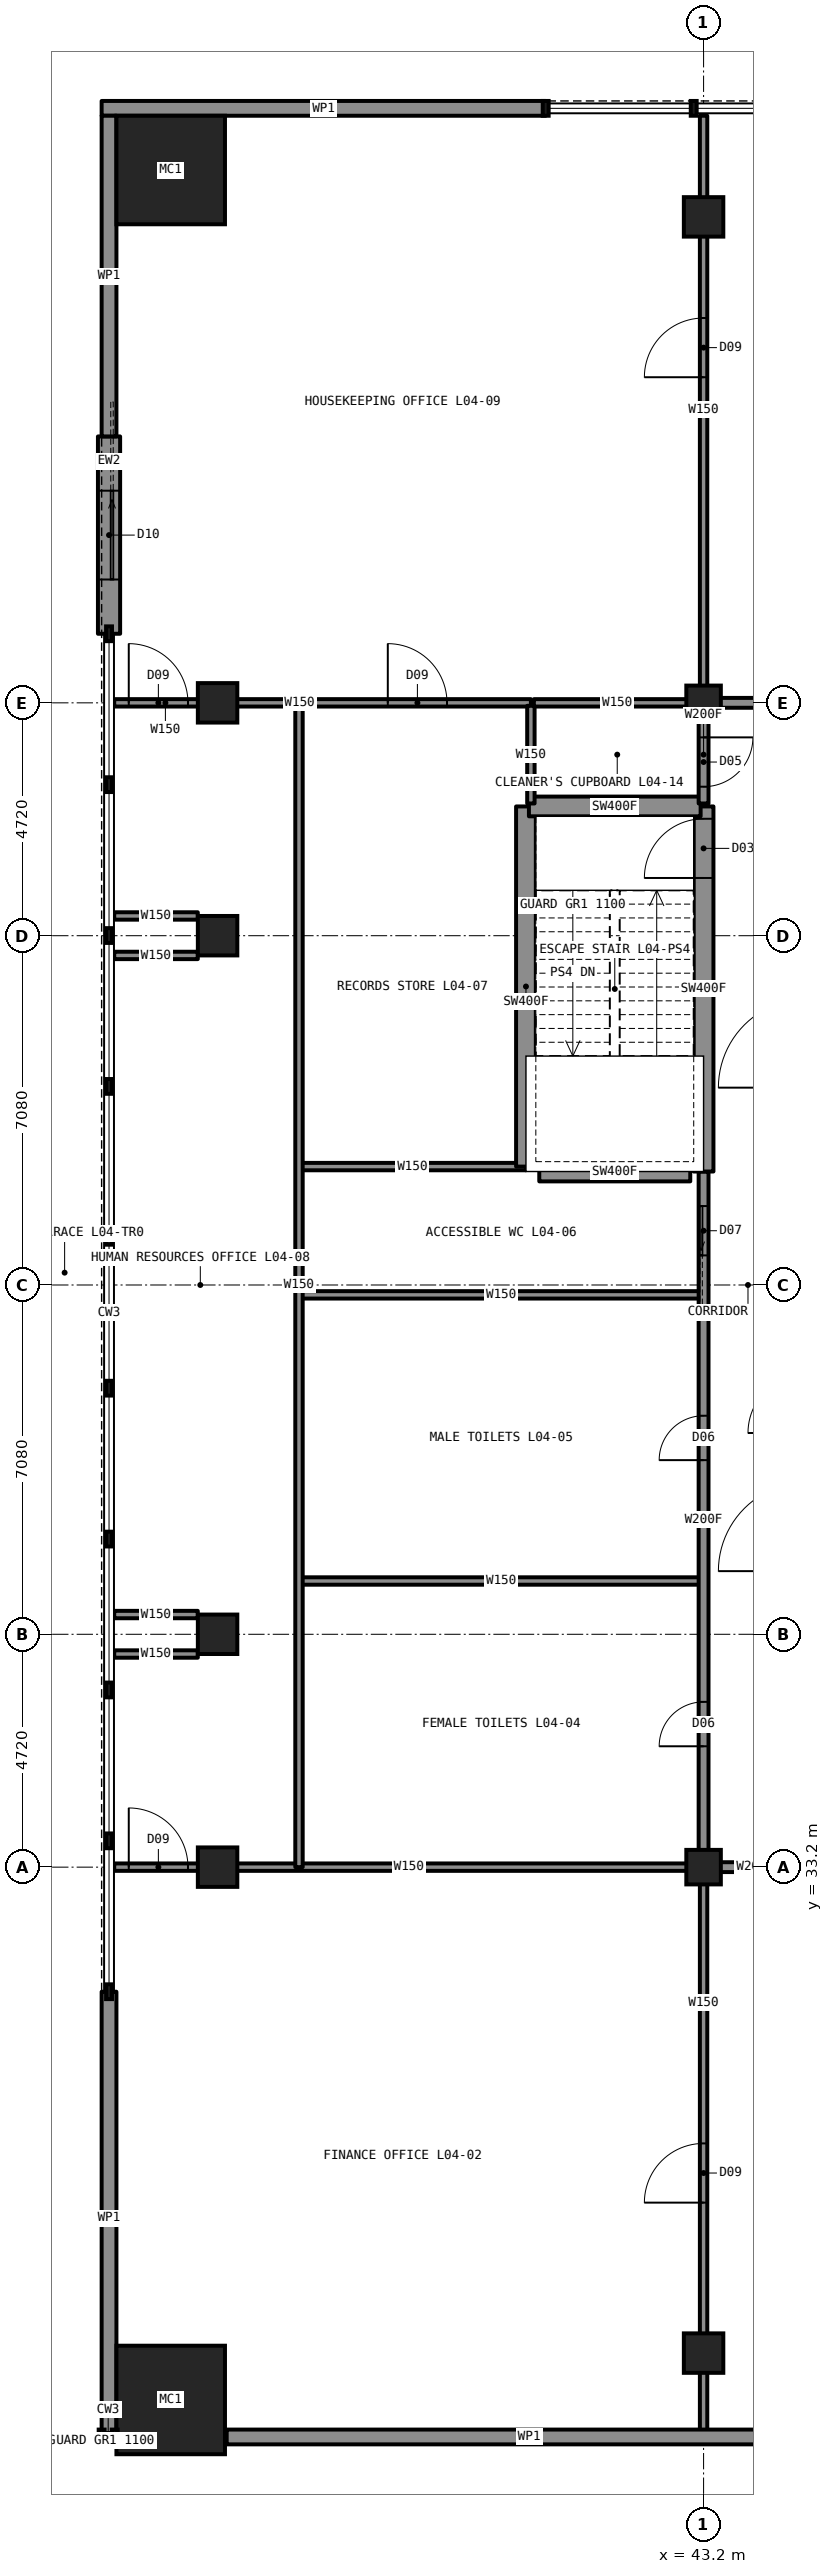
"""IFC4 building model, lengths in metres.
Left out: names, types, materials, properties, quantities, classifications, styles, units other than length and angle.
Written with IfcOpenShell. Run it as: python <this file> out.ifc"""

import sys

from ifc_helpers import new_model, si_unit, direction, frame, frame_2d, origin, origin_2d, place, context, subcontext, project, spatial, rectangle, hollow_rectangle, extrude, element, fill, save


model = new_model("IFC4")
c1 = context("Model", 3, precision=1e-05, world=origin(), true_north=direction((0.0, 1.0)))
c2 = subcontext(c1, "Body", "Model", "MODEL_VIEW")
j1 = project(units=[si_unit("LENGTHUNIT", "METRE"), si_unit("PLANEANGLEUNIT", "RADIAN")], contexts=[c1])
p1 = place(None, origin())
s1 = spatial("IfcSite", under=j1, at=p1, CompositionType="ELEMENT")
p2 = place(p1, origin())
s2 = spatial("IfcBuilding", under=s1, at=p2, CompositionType="ELEMENT")
p3 = place(p2, frame((0.0, 0.0, 20.5)))
s3 = spatial("IfcBuildingStorey", under=s2, at=p3, CompositionType="ELEMENT", Elevation=20.5)
for number, where, z_axis, x_axis in (
    (1, (33.35, 33.2, 0.0), (0.0, 0.0, 1.0), (1.0, 0.0, 0.0)),
    (2, (33.35, 37.92, 0.0), (0.0, 0.0, 1.0), (1.0, 0.0, 0.0)),
    (3, (33.35, 52.08, 0.0), (0.0, 0.0, 1.0), (1.0, 0.0, 0.0)),
    (4, (33.35, 56.8, 0.0), (0.0, 0.0, 1.0), (1.0, 0.0, 0.0)),
    (5, (43.2, 23.35, 0.0), (0.0, 0.0, 1.0), (1.0, 0.0, 0.0)),
    (6, (43.2, 66.65, 0.0), (0.0, 0.0, 1.0), (1.0, 0.0, 0.0)),
):
    element("IfcColumn", number, at=place(p3, frame(where, z_axis=z_axis, x_axis=x_axis)), inside=s3, PredefinedType="COLUMN", context=c2, shape_type="SweptSolid", body=[
        extrude(hollow_rectangle(XDim=0.8, YDim=0.8, WallThickness=0.05, at=origin_2d()), origin(), (0.0, 0.0, 1.0), 4.5),
    ])
for number, where, z_axis, x_axis in (
    (7, (43.2, 33.2, 0.0), (0.0, 0.0, 1.0), (1.0, 0.0, 0.0)),
    (8, (43.2, 56.8, 0.0), (0.0, 0.0, 1.0), (1.0, 0.0, 0.0)),
):
    element("IfcColumn", number, at=place(p3, frame(where, z_axis=z_axis, x_axis=x_axis)), inside=s3, PredefinedType="COLUMN", context=c2, shape_type="SweptSolid", body=[
        extrude(hollow_rectangle(XDim=0.7, YDim=0.7, WallThickness=0.06, at=origin_2d()), origin(), (0.0, 0.0, 1.0), 4.5),
    ])
for number, where, z_axis, x_axis in (
    (9, (32.4, 67.6, 0.0), (0.0, 0.0, 1.0), (1.0, 0.0, 0.0)),
    (10, (32.4, 22.4, 0.0), (0.0, 0.0, 1.0), (1.0, 0.0, 0.0)),
):
    element("IfcColumn", number, at=place(p3, frame(where, z_axis=z_axis, x_axis=x_axis)), inside=s3, PredefinedType="COLUMN", context=c2, shape_type="SweptSolid", body=[
        extrude(hollow_rectangle(XDim=2.2, YDim=2.2, WallThickness=0.15, at=origin_2d()), origin(), (0.0, 0.0, 1.0), 4.5),
    ])
p4 = place(p3, frame((35.0, 44.8, 0.0), z_axis=(0.0, 0.0, 1.0), x_axis=(1.0, 0.0, 0.0)))
e11 = element("IfcWall", 11, at=p4, inside=s3, PredefinedType="PARTITIONING", context=c2, shape_type="SweptSolid", body=[
    extrude(rectangle(XDim=8.2, YDim=0.15, at=frame_2d((4.1, 0.0))), origin(), (0.0, 0.0, 1.0), 3.13),
])
p5 = place(p3, frame((43.2, 33.2, 0.0), z_axis=(0.0, 0.0, 1.0), x_axis=(1.0, 0.0, 0.0)))
e12 = element("IfcWall", 12, at=p5, inside=s3, PredefinedType="PARTITIONING", context=c2, shape_type="SweptSolid", body=[
    extrude(rectangle(XDim=2.1, YDim=0.2, at=frame_2d((1.05, 0.0))), origin(), (0.0, 0.0, 1.0), 4.33),
])
p6 = place(p3, frame((31.255, 33.2, 0.0), z_axis=(0.0, 0.0, 1.0), x_axis=(1.0, 0.0, 0.0)))
e13 = element("IfcWall", 13, at=p6, inside=s3, PredefinedType="PARTITIONING", context=c2, shape_type="SweptSolid", body=[
    extrude(rectangle(XDim=11.945, YDim=0.15, at=frame_2d((5.973, 0.0))), origin(), (0.0, 0.0, 1.0), 3.13),
])
p7 = place(p6, frame((0.295, 0.0, 0.0)))
e14 = element("IfcOpeningElement", 14, at=p7, cuts=e13, PredefinedType="OPENING", context=c2, shape_type="SweptSolid", body=[
    extrude(rectangle(XDim=1.2, YDim=2.2, at=frame_2d((0.6, 1.1))), frame((0.0, 0.085, 0.0), z_axis=(0.0, -1.0, 0.0), x_axis=(1.0, 0.0, 0.0)), (0.0, 0.0, 1.0), 0.17),
])
p8 = place(p3, frame((35.0, 39.0, 0.0), z_axis=(0.0, 0.0, 1.0), x_axis=(1.0, 0.0, 0.0)))
e15 = element("IfcWall", 15, at=p8, inside=s3, PredefinedType="PARTITIONING", context=c2, shape_type="SweptSolid", body=[
    extrude(rectangle(XDim=8.2, YDim=0.15, at=frame_2d((4.1, 0.0))), origin(), (0.0, 0.0, 1.0), 4.33),
])
p9 = place(p3, frame((43.2, 56.8, 0.0), z_axis=(0.0, 0.0, 1.0), x_axis=(1.0, 0.0, 0.0)))
e16 = element("IfcWall", 16, at=p9, inside=s3, PredefinedType="PARTITIONING", context=c2, shape_type="SweptSolid", body=[
    extrude(rectangle(XDim=14.1, YDim=0.2, at=frame_2d((7.05, 0.0))), origin(), (0.0, 0.0, 1.0), 4.33),
])
p10 = place(p9, frame((4.9, 0.0, 0.0)))
e17 = element("IfcOpeningElement", 17, at=p10, cuts=e16, PredefinedType="OPENING", context=c2, shape_type="SweptSolid", body=[
    extrude(rectangle(XDim=1.8, YDim=2.2, at=frame_2d((0.9, 1.1))), frame((0.0, 0.11, 0.0), z_axis=(0.0, -1.0, 0.0), x_axis=(1.0, 0.0, 0.0)), (0.0, 0.0, 1.0), 0.22),
])
p11 = place(p3, frame((33.33, 56.8, 0.0), z_axis=(0.0, 0.0, 1.0), x_axis=(1.0, 0.0, 0.0)))
e18 = element("IfcWall", 18, at=p11, inside=s3, PredefinedType="PARTITIONING", context=c2, shape_type="SweptSolid", body=[
    extrude(rectangle(XDim=6.37, YDim=0.15, at=frame_2d((3.185, 0.0))), origin(), (0.0, 0.0, 1.0), 3.13),
])
p12 = place(p11, frame((3.47, 0.0, 0.0)))
e19 = element("IfcOpeningElement", 19, at=p12, cuts=e18, PredefinedType="OPENING", context=c2, shape_type="SweptSolid", body=[
    extrude(rectangle(XDim=1.2, YDim=2.2, at=frame_2d((0.6, 1.1))), frame((0.0, 0.085, 0.0), z_axis=(0.0, -1.0, 0.0), x_axis=(1.0, 0.0, 0.0)), (0.0, 0.0, 1.0), 0.17),
])
p13 = place(p3, frame((39.87, 47.3, 0.0), z_axis=(0.0, 0.0, 1.0), x_axis=(1.0, 0.0, 0.0)))
e20 = element("IfcWall", 20, at=p13, inside=s3, PredefinedType="SHEAR", context=c2, shape_type="SweptSolid", body=[
    extrude(rectangle(XDim=3.06, YDim=0.4, at=frame_2d((1.53, 0.0))), origin(), (0.0, 0.0, 1.0), 4.5),
])
p14 = place(p3, frame((35.0, 47.4, 0.0), z_axis=(0.0, 0.0, 1.0), x_axis=(1.0, 0.0, 0.0)))
e21 = element("IfcWall", 21, at=p14, inside=s3, PredefinedType="PARTITIONING", context=c2, shape_type="SweptSolid", body=[
    extrude(rectangle(XDim=4.6, YDim=0.15, at=frame_2d((2.3, 0.0))), origin(), (0.0, 0.0, 1.0), 4.33),
])
p15 = place(p3, frame((43.2, 33.2, 0.0), z_axis=(0.0, 0.0, 1.0), x_axis=(0.0, 1.0, 0.0)))
e22 = element("IfcWall", 22, at=p15, inside=s3, PredefinedType="PARTITIONING", context=c2, shape_type="SweptSolid", body=[
    extrude(rectangle(XDim=14.1, YDim=0.2, at=frame_2d((7.05, 0.0))), origin(), (0.0, 0.0, 1.0), 4.33),
])
p16 = place(p15, frame((12.4, 0.0, 0.0)))
e23 = element("IfcOpeningElement", 23, at=p16, cuts=e22, PredefinedType="OPENING", context=c2, shape_type="SweptSolid", body=[
    extrude(rectangle(XDim=1.0, YDim=2.1, at=frame_2d((0.5, 1.05))), frame((0.0, 0.11, 0.0), z_axis=(0.0, -1.0, 0.0), x_axis=(1.0, 0.0, 0.0)), (0.0, 0.0, 1.0), 0.22),
])
p17 = place(p15, frame((2.45, 0.0, 0.0)))
e24 = element("IfcOpeningElement", 24, at=p17, cuts=e22, PredefinedType="OPENING", context=c2, shape_type="SweptSolid", body=[
    extrude(rectangle(XDim=0.9, YDim=2.1, at=frame_2d((0.45, 1.05))), frame((0.0, 0.11, 0.0), z_axis=(0.0, -1.0, 0.0), x_axis=(1.0, 0.0, 0.0)), (0.0, 0.0, 1.0), 0.22),
])
p18 = place(p15, frame((8.25, 0.0, 0.0)))
e25 = element("IfcOpeningElement", 25, at=p18, cuts=e22, PredefinedType="OPENING", context=c2, shape_type="SweptSolid", body=[
    extrude(rectangle(XDim=0.9, YDim=2.1, at=frame_2d((0.45, 1.05))), frame((0.0, 0.11, 0.0), z_axis=(0.0, -1.0, 0.0), x_axis=(1.0, 0.0, 0.0)), (0.0, 0.0, 1.0), 0.22),
])
p19 = place(p3, frame((43.2, 21.755, 0.0), z_axis=(0.0, 0.0, 1.0), x_axis=(0.0, 1.0, 0.0)))
e26 = element("IfcWall", 26, at=p19, inside=s3, PredefinedType="PARTITIONING", context=c2, shape_type="SweptSolid", body=[
    extrude(rectangle(XDim=11.445, YDim=0.15, at=frame_2d((5.723, 0.0))), origin(), (0.0, 0.0, 1.0), 3.13),
])
p20 = place(p19, frame((4.645, 0.0, 0.0)))
e27 = element("IfcOpeningElement", 27, at=p20, cuts=e26, PredefinedType="OPENING", context=c2, shape_type="SweptSolid", body=[
    extrude(rectangle(XDim=1.2, YDim=2.2, at=frame_2d((0.6, 1.1))), frame((0.0, 0.085, 0.0), z_axis=(0.0, -1.0, 0.0), x_axis=(1.0, 0.0, 0.0)), (0.0, 0.0, 1.0), 0.17),
])
p21 = place(p3, frame((43.2, 56.8, 0.0), z_axis=(0.0, 0.0, 1.0), x_axis=(0.0, 1.0, 0.0)))
e28 = element("IfcWall", 28, at=p21, inside=s3, PredefinedType="PARTITIONING", context=c2, shape_type="SweptSolid", body=[
    extrude(rectangle(XDim=11.9, YDim=0.15, at=frame_2d((5.95, 0.0))), origin(), (0.0, 0.0, 1.0), 3.13),
])
p22 = place(p21, frame((6.6, 0.0, 0.0)))
e29 = element("IfcOpeningElement", 29, at=p22, cuts=e28, PredefinedType="OPENING", context=c2, shape_type="SweptSolid", body=[
    extrude(rectangle(XDim=1.2, YDim=2.2, at=frame_2d((0.6, 1.1))), frame((0.0, 0.085, 0.0), z_axis=(0.0, -1.0, 0.0), x_axis=(1.0, 0.0, 0.0)), (0.0, 0.0, 1.0), 0.17),
])
p23 = place(p3, frame((43.2, 47.3, 0.0), z_axis=(0.0, 0.0, 1.0), x_axis=(0.0, 1.0, 0.0)))
e30 = element("IfcWall", 30, at=p23, inside=s3, PredefinedType="SHEAR", context=c2, shape_type="SweptSolid", body=[
    extrude(rectangle(XDim=7.4, YDim=0.4, at=frame_2d((3.7, 0.0))), origin(), (0.0, 0.0, 1.0), 4.5),
])
p24 = place(p23, frame((5.95, 0.0, 0.0)))
e31 = element("IfcOpeningElement", 31, at=p24, cuts=e30, PredefinedType="OPENING", context=c2, shape_type="SweptSolid", body=[
    extrude(rectangle(XDim=1.2, YDim=2.2, at=frame_2d((0.6, 1.1))), frame((0.0, 0.21, 0.0), z_axis=(0.0, -1.0, 0.0), x_axis=(1.0, 0.0, 0.0)), (0.0, 0.0, 1.0), 0.42),
])
p25 = place(p3, frame((39.6, 47.4, 0.0), z_axis=(0.0, 0.0, 1.0), x_axis=(0.0, 1.0, 0.0)))
e32 = element("IfcWall", 32, at=p25, inside=s3, PredefinedType="SHEAR", context=c2, shape_type="SweptSolid", body=[
    extrude(rectangle(XDim=7.3, YDim=0.4, at=frame_2d((3.65, 0.0))), origin(), (0.0, 0.0, 1.0), 4.5),
])
p26 = place(p3, frame((35.0, 33.2, 0.0), z_axis=(0.0, 0.0, 1.0), x_axis=(0.0, 1.0, 0.0)))
e33 = element("IfcWall", 33, at=p26, inside=s3, PredefinedType="PARTITIONING", context=c2, shape_type="SweptSolid", body=[
    extrude(rectangle(XDim=23.6, YDim=0.15, at=frame_2d((11.8, 0.0))), origin(), (0.0, 0.0, 1.0), 4.33),
])
p27 = place(p3, frame((43.14, 54.7, 0.0), z_axis=(0.0, 0.0, 1.0), x_axis=(-1.0, 0.0, 0.0)))
e34 = element("IfcWall", 34, at=p27, inside=s3, PredefinedType="SHEAR", context=c2, shape_type="SweptSolid", body=[
    extrude(rectangle(XDim=3.48, YDim=0.4, at=frame_2d((1.74, 0.0))), origin(), (0.0, 0.0, 1.0), 4.5),
])
p28 = place(p3, frame((43.2, 56.74, 0.0), z_axis=(0.0, 0.0, 1.0), x_axis=(0.0, -1.0, 0.0)))
e35 = element("IfcWall", 35, at=p28, inside=s3, PredefinedType="PARTITIONING", context=c2, shape_type="SweptSolid", body=[
    extrude(rectangle(XDim=1.98, YDim=0.2, at=frame_2d((0.99, 0.0))), origin(), (0.0, 0.0, 1.0), 4.33),
])
p29 = place(p28, frame((0.64, 0.0, 0.0)))
e36 = element("IfcOpeningElement", 36, at=p29, cuts=e35, PredefinedType="OPENING", context=c2, shape_type="SweptSolid", body=[
    extrude(rectangle(XDim=1.0, YDim=2.1, at=frame_2d((0.5, 1.05))), frame((0.0, 0.11, 0.0), z_axis=(0.0, -1.0, 0.0), x_axis=(1.0, 0.0, 0.0)), (0.0, 0.0, 1.0), 0.22),
])
p30 = place(p3, frame((39.7, 54.76, 0.0), z_axis=(0.0, 0.0, 1.0), x_axis=(0.0, 1.0, 0.0)))
e37 = element("IfcWall", 37, at=p30, inside=s3, PredefinedType="PARTITIONING", context=c2, shape_type="SweptSolid", body=[
    extrude(rectangle(XDim=1.98, YDim=0.15, at=frame_2d((0.99, 0.0))), origin(), (0.0, 0.0, 1.0), 4.33),
])
p31 = place(p3, frame((39.76, 56.8, 0.0), z_axis=(0.0, 0.0, 1.0), x_axis=(1.0, 0.0, 0.0)))
e38 = element("IfcWall", 38, at=p31, inside=s3, PredefinedType="PARTITIONING", context=c2, shape_type="SweptSolid", body=[
    extrude(rectangle(XDim=3.38, YDim=0.15, at=frame_2d((1.69, 0.0))), origin(), (0.0, 0.0, 1.0), 3.13),
])
for number, where, z_axis, x_axis in (
    (39, (32.949, 38.32, 0.0), (0.0, 0.0, 1.0), (-1.0, 0.0, 0.0)),
    (40, (31.255, 37.52, 0.0), (0.0, 0.0, 1.0), (1.0, 0.0, 0.0)),
    (41, (32.949, 52.48, 0.0), (0.0, 0.0, 1.0), (-1.0, 0.0, 0.0)),
    (42, (31.255, 51.68, 0.0), (0.0, 0.0, 1.0), (1.0, 0.0, 0.0)),
):
    element("IfcWall", number, at=place(p3, frame(where, z_axis=z_axis, x_axis=x_axis)), inside=s3, PredefinedType="PARTITIONING", context=c2, shape_type="SweptSolid", body=[
        extrude(rectangle(XDim=1.694, YDim=0.15, at=frame_2d((0.847, 0.0))), origin(), (0.0, 0.0, 1.0), 4.33),
    ])
p32 = place(p3, frame((31.15, 62.2, 0.0), z_axis=(0.0, 0.0, 1.0), x_axis=(0.0, -1.0, 0.0)))
e43 = element("IfcWall", 43, at=p32, inside=s3, PredefinedType="SOLIDWALL", context=c2, shape_type="SweptSolid", body=[
    extrude(rectangle(XDim=4.0, YDim=0.45, at=frame_2d((2.0, 0.0))), origin(), (0.0, 0.0, 1.0), 4.33),
])
p33 = place(p32, frame((1.1, 0.0, 0.0)))
e44 = element("IfcOpeningElement", 44, at=p33, cuts=e43, PredefinedType="OPENING", context=c2, shape_type="SweptSolid", body=[
    extrude(rectangle(XDim=1.8, YDim=2.4, at=frame_2d((0.9, 1.2))), frame((0.0, 0.235, 0.0), z_axis=(0.0, -1.0, 0.0), x_axis=(1.0, 0.0, 0.0)), (0.0, 0.0, 1.0), 0.47),
])
p34 = place(p3, frame((31.255, 56.8, 0.0), z_axis=(0.0, 0.0, 1.0), x_axis=(1.0, 0.0, 0.0)))
e45 = element("IfcWall", 45, at=p34, inside=s3, PredefinedType="PARTITIONING", context=c2, shape_type="SweptSolid", body=[
    extrude(rectangle(XDim=2.075, YDim=0.15, at=frame_2d((1.038, 0.0))), origin(), (0.0, 0.0, 1.0), 4.33),
])
p35 = place(p34, frame((0.295, 0.0, 0.0)))
e46 = element("IfcOpeningElement", 46, at=p35, cuts=e45, PredefinedType="OPENING", context=c2, shape_type="SweptSolid", body=[
    extrude(rectangle(XDim=1.2, YDim=2.2, at=frame_2d((0.6, 1.1))), frame((0.0, 0.085, 0.0), z_axis=(0.0, -1.0, 0.0), x_axis=(1.0, 0.0, 0.0)), (0.0, 0.0, 1.0), 0.17),
])
p36 = place(p3, frame((40.0, 68.85, 0.0), z_axis=(0.0, 0.0, 1.0), x_axis=(-1.0, 0.0, 0.0)))
e47 = element("IfcWall", 47, at=p36, inside=s3, PredefinedType="SOLIDWALL", context=c2, shape_type="SweptSolid", body=[
    extrude(rectangle(XDim=9.0, YDim=0.3, at=frame_2d((4.5, 0.0))), origin(), (0.0, 0.0, 1.0), 4.33),
])
p37 = place(p3, frame((33.534, 21.65, 0.0), z_axis=(0.0, 0.0, 1.0), x_axis=(1.0, 0.0, 0.0)))
e48 = element("IfcWall", 48, at=p37, inside=s3, PredefinedType="SOLIDWALL", context=c2, shape_type="SweptSolid", body=[
    extrude(rectangle(XDim=12.266, YDim=0.3, at=frame_2d((6.133, 0.0))), origin(), (0.0, 0.0, 1.0), 4.33),
])
p38 = place(p3, frame((31.15, 68.7, 0.0), z_axis=(0.0, 0.0, 1.0), x_axis=(0.0, -1.0, 0.0)))
e49 = element("IfcWall", 49, at=p38, inside=s3, PredefinedType="SOLIDWALL", context=c2, shape_type="SweptSolid", body=[
    extrude(rectangle(XDim=6.5, YDim=0.3, at=frame_2d((3.25, 0.0))), origin(), (0.0, 0.0, 1.0), 4.33),
])
p39 = place(p3, frame((31.15, 30.675, 0.0), z_axis=(0.0, 0.0, 1.0), x_axis=(0.0, -1.0, 0.0)))
e50 = element("IfcWall", 50, at=p39, inside=s3, PredefinedType="SOLIDWALL", context=c2, shape_type="SweptSolid", body=[
    extrude(rectangle(XDim=9.175, YDim=0.3, at=frame_2d((4.587, 0.0))), origin(), (0.0, 0.0, 1.0), 4.33),
])
p40 = place(p24, origin())
e51 = element("IfcDoor", 51, at=p40, inside=s3, OperationType="SINGLE_SWING_LEFT", PredefinedType="DOOR", context=c2, shape_type="SweptSolid", body=[
    extrude(rectangle(XDim=1.2, YDim=2.2, at=frame_2d((0.6, 1.1))), frame((0.0, 0.025, 0.0), z_axis=(0.0, -1.0, 0.0), x_axis=(1.0, 0.0, 0.0)), (0.0, 0.0, 1.0), 0.05),
])
fill(e31, e51)
p41 = place(p20, origin())
e52 = element("IfcDoor", 52, at=p41, inside=s3, OperationType="SINGLE_SWING_LEFT", PredefinedType="DOOR", context=c2, shape_type="SweptSolid", body=[
    extrude(rectangle(XDim=1.2, YDim=2.2, at=frame_2d((0.6, 1.1))), frame((0.0, 0.025, 0.0), z_axis=(0.0, -1.0, 0.0), x_axis=(1.0, 0.0, 0.0)), (0.0, 0.0, 1.0), 0.05),
])
fill(e27, e52)
p42 = place(p12, origin())
e53 = element("IfcDoor", 53, at=p42, inside=s3, OperationType="SINGLE_SWING_LEFT", PredefinedType="DOOR", context=c2, shape_type="SweptSolid", body=[
    extrude(rectangle(XDim=1.2, YDim=2.2, at=frame_2d((0.6, 1.1))), frame((0.0, 0.025, 0.0), z_axis=(0.0, -1.0, 0.0), x_axis=(1.0, 0.0, 0.0)), (0.0, 0.0, 1.0), 0.05),
])
fill(e19, e53)
p43 = place(p22, origin())
e54 = element("IfcDoor", 54, at=p43, inside=s3, OperationType="SINGLE_SWING_LEFT", PredefinedType="DOOR", context=c2, shape_type="SweptSolid", body=[
    extrude(rectangle(XDim=1.2, YDim=2.2, at=frame_2d((0.6, 1.1))), frame((0.0, 0.025, 0.0), z_axis=(0.0, -1.0, 0.0), x_axis=(1.0, 0.0, 0.0)), (0.0, 0.0, 1.0), 0.05),
])
fill(e29, e54)
p44 = place(p35, origin())
e55 = element("IfcDoor", 55, at=p44, inside=s3, OperationType="SINGLE_SWING_LEFT", PredefinedType="DOOR", context=c2, shape_type="SweptSolid", body=[
    extrude(rectangle(XDim=1.2, YDim=2.2, at=frame_2d((0.6, 1.1))), frame((0.0, 0.025, 0.0), z_axis=(0.0, -1.0, 0.0), x_axis=(1.0, 0.0, 0.0)), (0.0, 0.0, 1.0), 0.05),
])
fill(e46, e55)
p45 = place(p7, origin())
e56 = element("IfcDoor", 56, at=p45, inside=s3, OperationType="SINGLE_SWING_LEFT", PredefinedType="DOOR", context=c2, shape_type="SweptSolid", body=[
    extrude(rectangle(XDim=1.2, YDim=2.2, at=frame_2d((0.6, 1.1))), frame((0.0, 0.025, 0.0), z_axis=(0.0, -1.0, 0.0), x_axis=(1.0, 0.0, 0.0)), (0.0, 0.0, 1.0), 0.05),
])
fill(e14, e56)
p46 = place(p29, origin())
e57 = element("IfcDoor", 57, at=p46, inside=s3, OperationType="SINGLE_SWING_LEFT", PredefinedType="DOOR", context=c2, shape_type="SweptSolid", body=[
    extrude(rectangle(XDim=1.0, YDim=2.1, at=frame_2d((0.5, 1.05))), frame((0.0, 0.025, 0.0), z_axis=(0.0, -1.0, 0.0), x_axis=(1.0, 0.0, 0.0)), (0.0, 0.0, 1.0), 0.05),
])
fill(e36, e57)
p47 = place(p16, origin())
e58 = element("IfcDoor", 58, at=p47, inside=s3, OperationType="SLIDING_TO_LEFT", PredefinedType="DOOR", context=c2, shape_type="SweptSolid", body=[
    extrude(rectangle(XDim=1.0, YDim=2.1, at=frame_2d((0.5, 1.05))), frame((0.0, 0.025, 0.0), z_axis=(0.0, -1.0, 0.0), x_axis=(1.0, 0.0, 0.0)), (0.0, 0.0, 1.0), 0.05),
])
fill(e23, e58)
p48 = place(p17, origin())
e59 = element("IfcDoor", 59, at=p48, inside=s3, OperationType="SINGLE_SWING_LEFT", PredefinedType="DOOR", context=c2, shape_type="SweptSolid", body=[
    extrude(rectangle(XDim=0.9, YDim=2.1, at=frame_2d((0.45, 1.05))), frame((0.0, 0.025, 0.0), z_axis=(0.0, -1.0, 0.0), x_axis=(1.0, 0.0, 0.0)), (0.0, 0.0, 1.0), 0.05),
])
fill(e24, e59)
p49 = place(p18, origin())
e60 = element("IfcDoor", 60, at=p49, inside=s3, OperationType="SINGLE_SWING_LEFT", PredefinedType="DOOR", context=c2, shape_type="SweptSolid", body=[
    extrude(rectangle(XDim=0.9, YDim=2.1, at=frame_2d((0.45, 1.05))), frame((0.0, 0.025, 0.0), z_axis=(0.0, -1.0, 0.0), x_axis=(1.0, 0.0, 0.0)), (0.0, 0.0, 1.0), 0.05),
])
fill(e25, e60)
p50 = place(p33, origin())
e61 = element("IfcDoor", 61, at=p50, inside=s3, OperationType="SLIDING_TO_LEFT", PredefinedType="DOOR", context=c2, shape_type="SweptSolid", body=[
    extrude(rectangle(XDim=1.8, YDim=2.4, at=frame_2d((0.9, 1.2))), frame((0.0, 0.025, 0.0), z_axis=(0.0, -1.0, 0.0), x_axis=(1.0, 0.0, 0.0)), (0.0, 0.0, 1.0), 0.05),
])
fill(e44, e61)
save(model, sys.argv[1])
